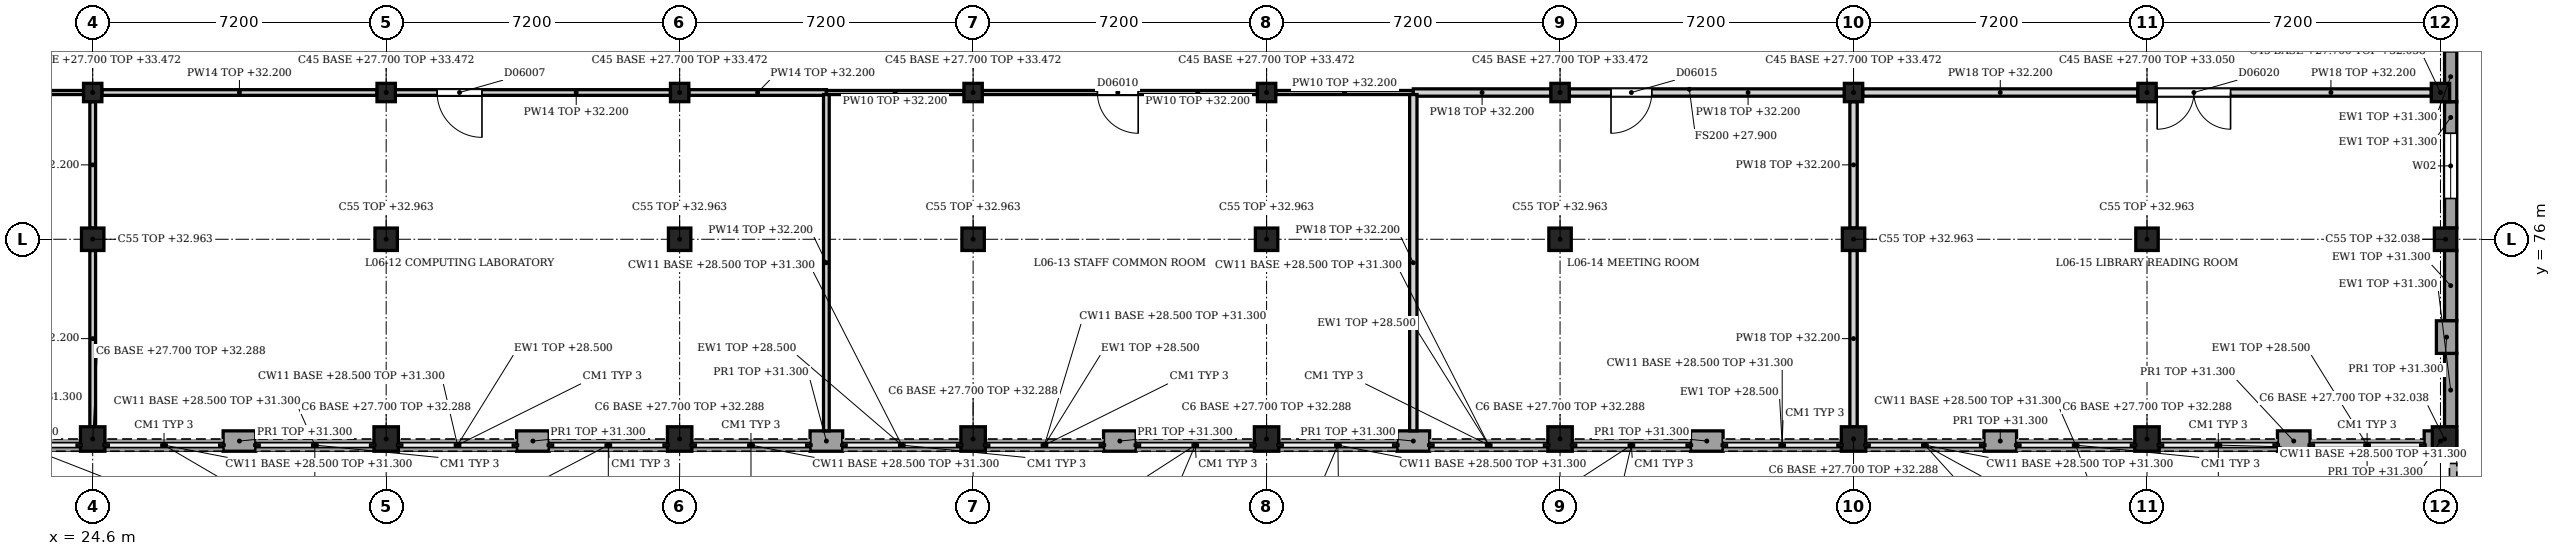
"""IFC4 building model, lengths in metres.
Left out: names, types, materials, properties, quantities, classifications, styles, units other than length and angle.
Written with IfcOpenShell. Run it as: python <this file> out.ifc"""

import sys

from ifc_helpers import new_model, si_unit, direction, frame, frame_2d, origin, origin_2d, place, context, subcontext, project, spatial, rectangle, extrude, element, fill, save


model = new_model("IFC4")
c1 = context("Model", 3, precision=1e-05, world=origin(), true_north=direction((0.0, 1.0)))
c2 = subcontext(c1, "Body", "Model", "MODEL_VIEW")
j1 = project(units=[si_unit("LENGTHUNIT", "METRE"), si_unit("PLANEANGLEUNIT", "RADIAN")], contexts=[c1])
p1 = place(None, origin())
s1 = spatial("IfcSite", under=j1, at=p1, CompositionType="ELEMENT")
p2 = place(p1, origin())
s2 = spatial("IfcBuilding", under=s1, at=p2, CompositionType="ELEMENT")
p3 = place(p2, frame((0.0, 0.0, 27.9)))
s3 = spatial("IfcBuildingStorey", under=s2, at=p3, CompositionType="ELEMENT", Elevation=27.9)
for number, where, z_axis, x_axis in (
    (1, (24.6, 76.0, 0.0), (0.0, 0.0, 1.0), (1.0, 0.0, 0.0)),
    (2, (31.8, 76.0, 0.0), (0.0, 0.0, 1.0), (1.0, 0.0, 0.0)),
    (3, (39.0, 76.0, 0.0), (0.0, 0.0, 1.0), (1.0, 0.0, 0.0)),
    (4, (46.2, 76.0, 0.0), (0.0, 0.0, 1.0), (1.0, 0.0, 0.0)),
    (5, (53.4, 76.0, 0.0), (0.0, 0.0, 1.0), (1.0, 0.0, 0.0)),
    (6, (60.6, 76.0, 0.0), (0.0, 0.0, 1.0), (1.0, 0.0, 0.0)),
    (7, (67.8, 76.0, 0.0), (0.0, 0.0, 1.0), (1.0, 0.0, 0.0)),
    (8, (75.0, 76.0, 0.0), (0.0, 0.0, 1.0), (1.0, 0.0, 0.0)),
):
    element("IfcColumn", number, at=place(p3, frame(where, z_axis=z_axis, x_axis=x_axis)), inside=s3, PredefinedType="COLUMN", context=c2, shape_type="SweptSolid", body=[
        extrude(rectangle(XDim=0.55, YDim=0.55, at=origin_2d()), origin(), (0.0, 0.0, 1.0), 5.063),
    ])
p4 = place(p3, frame((82.325, 76.0, 0.0), z_axis=(0.0, 0.0, 1.0), x_axis=(1.0, 0.0, 0.0)))
e9 = element("IfcColumn", 9, at=p4, inside=s3, PredefinedType="COLUMN", context=c2, shape_type="SweptSolid", body=[
    extrude(rectangle(XDim=0.55, YDim=0.55, at=origin_2d()), origin(), (0.0, 0.0, 1.0), 4.138),
])
for number, where, z_axis, x_axis in (
    (10, (24.6, 71.1, -0.2), (0.0, 0.0, 1.0), (1.0, 0.0, 0.0)),
    (11, (31.8, 71.1, -0.2), (0.0, 0.0, 1.0), (1.0, 0.0, 0.0)),
    (12, (39.0, 71.1, -0.2), (0.0, 0.0, 1.0), (1.0, 0.0, 0.0)),
    (13, (46.2, 71.1, -0.2), (0.0, 0.0, 1.0), (1.0, 0.0, 0.0)),
    (14, (53.4, 71.1, -0.2), (0.0, 0.0, 1.0), (1.0, 0.0, 0.0)),
    (15, (60.6, 71.1, -0.2), (0.0, 0.0, 1.0), (1.0, 0.0, 0.0)),
    (16, (67.8, 71.1, -0.2), (0.0, 0.0, 1.0), (1.0, 0.0, 0.0)),
    (17, (75.0, 71.1, -0.2), (0.0, 0.0, 1.0), (1.0, 0.0, 0.0)),
):
    element("IfcColumn", number, at=place(p3, frame(where, z_axis=z_axis, x_axis=x_axis)), inside=s3, PredefinedType="COLUMN", context=c2, shape_type="SweptSolid", body=[
        extrude(rectangle(XDim=0.6, YDim=0.6, at=origin_2d()), origin(), (0.0, 0.0, 1.0), 4.588),
    ])
p5 = place(p3, frame((82.3, 71.1, -0.2), z_axis=(0.0, 0.0, 1.0), x_axis=(1.0, 0.0, 0.0)))
e18 = element("IfcColumn", 18, at=p5, inside=s3, PredefinedType="COLUMN", context=c2, shape_type="SweptSolid", body=[
    extrude(rectangle(XDim=0.6, YDim=0.6, at=origin_2d()), origin(), (0.0, 0.0, 1.0), 4.338),
])
for number, where, z_axis, x_axis in (
    (19, (24.6, 79.6, -0.2), (0.0, 0.0, 1.0), (1.0, 0.0, 0.0)),
    (20, (31.8, 79.6, -0.2), (0.0, 0.0, 1.0), (1.0, 0.0, 0.0)),
    (21, (39.0, 79.6, -0.2), (0.0, 0.0, 1.0), (1.0, 0.0, 0.0)),
    (22, (46.2, 79.6, -0.2), (0.0, 0.0, 1.0), (1.0, 0.0, 0.0)),
    (23, (53.4, 79.6, -0.2), (0.0, 0.0, 1.0), (1.0, 0.0, 0.0)),
    (24, (60.6, 79.6, -0.2), (0.0, 0.0, 1.0), (1.0, 0.0, 0.0)),
    (25, (67.8, 79.6, -0.2), (0.0, 0.0, 1.0), (1.0, 0.0, 0.0)),
):
    element("IfcColumn", number, at=place(p3, frame(where, z_axis=z_axis, x_axis=x_axis)), inside=s3, PredefinedType="COLUMN", context=c2, shape_type="SweptSolid", body=[
        extrude(rectangle(XDim=0.45, YDim=0.45, at=origin_2d()), origin(), (0.0, 0.0, 1.0), 5.772),
    ])
p6 = place(p3, frame((75.0, 79.6, -0.2), z_axis=(0.0, 0.0, 1.0), x_axis=(1.0, 0.0, 0.0)))
e26 = element("IfcColumn", 26, at=p6, inside=s3, PredefinedType="COLUMN", context=c2, shape_type="SweptSolid", body=[
    extrude(rectangle(XDim=0.45, YDim=0.45, at=origin_2d()), origin(), (0.0, 0.0, 1.0), 5.35),
])
p7 = place(p3, frame((82.2, 79.6, -0.2), z_axis=(0.0, 0.0, 1.0), x_axis=(1.0, 0.0, 0.0)))
e27 = element("IfcColumn", 27, at=p7, inside=s3, PredefinedType="COLUMN", context=c2, shape_type="SweptSolid", body=[
    extrude(rectangle(XDim=0.45, YDim=0.45, at=origin_2d()), origin(), (0.0, 0.0, 1.0), 4.338),
])
for number, where, z_axis, x_axis in (
    (28, (82.6, 71.05, 0.0), (0.0, 0.0, 1.0), (-1.0, 0.0, 0.0)),
    (29, (79.0, 71.05, 0.0), (0.0, 0.0, 1.0), (-1.0, 0.0, 0.0)),
    (30, (71.8, 71.05, 0.0), (0.0, 0.0, 1.0), (-1.0, 0.0, 0.0)),
    (31, (64.6, 71.05, 0.0), (0.0, 0.0, 1.0), (-1.0, 0.0, 0.0)),
):
    element("IfcWall", number, at=place(p3, frame(where, z_axis=z_axis, x_axis=x_axis)), inside=s3, PredefinedType="SOLIDWALL", context=c2, shape_type="SweptSolid", body=[
        extrude(rectangle(XDim=0.8, YDim=0.5, at=frame_2d((0.4, 0.0))), origin(), (0.0, 0.0, 1.0), 3.4),
    ])
p8 = place(p3, frame((57.4, 71.05, 0.0), z_axis=(0.0, 0.0, 1.0), x_axis=(-1.0, 0.0, 0.0)))
e32 = element("IfcWall", 32, at=p8, inside=s3, PredefinedType="SOLIDWALL", context=c2, shape_type="SweptSolid", body=[
    extrude(rectangle(XDim=0.8, YDim=0.5, at=frame_2d((0.4, 0.0))), origin(), (0.0, 0.0, 1.0), 3.4),
])
for number, where, z_axis, x_axis in (
    (33, (50.2, 71.05, 0.0), (0.0, 0.0, 1.0), (-1.0, 0.0, 0.0)),
    (34, (43.0, 71.05, 0.0), (0.0, 0.0, 1.0), (-1.0, 0.0, 0.0)),
    (35, (35.8, 71.05, 0.0), (0.0, 0.0, 1.0), (-1.0, 0.0, 0.0)),
    (36, (28.6, 71.05, 0.0), (0.0, 0.0, 1.0), (-1.0, 0.0, 0.0)),
):
    element("IfcWall", number, at=place(p3, frame(where, z_axis=z_axis, x_axis=x_axis)), inside=s3, PredefinedType="SOLIDWALL", context=c2, shape_type="SweptSolid", body=[
        extrude(rectangle(XDim=0.8, YDim=0.5, at=frame_2d((0.4, 0.0))), origin(), (0.0, 0.0, 1.0), 3.4),
    ])
p9 = place(p3, frame((81.8, 70.95, 0.0), z_axis=(0.0, 0.0, 1.0), x_axis=(-1.0, 0.0, 0.0)))
e37 = element("IfcWall", 37, at=p9, inside=s3, PredefinedType="SOLIDWALL", context=c2, shape_type="SweptSolid", body=[
    extrude(rectangle(XDim=2.8, YDim=0.3, at=frame_2d((1.4, 0.0))), origin(), (0.0, 0.0, 1.0), 0.6),
])
for number, where, z_axis, x_axis in (
    (38, (78.2, 70.95, 0.0), (0.0, 0.0, 1.0), (-1.0, 0.0, 0.0)),
    (39, (74.7, 70.95, 0.0), (0.0, 0.0, 1.0), (-1.0, 0.0, 0.0)),
    (40, (71.0, 70.95, 0.0), (0.0, 0.0, 1.0), (-1.0, 0.0, 0.0)),
    (41, (67.5, 70.95, 0.0), (0.0, 0.0, 1.0), (-1.0, 0.0, 0.0)),
):
    element("IfcWall", number, at=place(p3, frame(where, z_axis=z_axis, x_axis=x_axis)), inside=s3, PredefinedType="SOLIDWALL", context=c2, shape_type="SweptSolid", body=[
        extrude(rectangle(XDim=2.9, YDim=0.3, at=frame_2d((1.45, 0.0))), origin(), (0.0, 0.0, 1.0), 0.6),
    ])
for number, where, z_axis, x_axis in (
    (42, (63.8, 70.95, 0.0), (0.0, 0.0, 1.0), (-1.0, 0.0, 0.0)),
    (43, (60.3, 70.95, 0.0), (0.0, 0.0, 1.0), (-1.0, 0.0, 0.0)),
    (44, (56.6, 70.95, 0.0), (0.0, 0.0, 1.0), (-1.0, 0.0, 0.0)),
    (45, (53.1, 70.95, 0.0), (0.0, 0.0, 1.0), (-1.0, 0.0, 0.0)),
):
    element("IfcWall", number, at=place(p3, frame(where, z_axis=z_axis, x_axis=x_axis)), inside=s3, PredefinedType="SOLIDWALL", context=c2, shape_type="SweptSolid", body=[
        extrude(rectangle(XDim=2.9, YDim=0.3, at=frame_2d((1.45, 0.0))), origin(), (0.0, 0.0, 1.0), 0.6),
    ])
for number, where, z_axis, x_axis in (
    (46, (49.4, 70.95, 0.0), (0.0, 0.0, 1.0), (-1.0, 0.0, 0.0)),
    (47, (45.9, 70.95, 0.0), (0.0, 0.0, 1.0), (-1.0, 0.0, 0.0)),
    (48, (42.2, 70.95, 0.0), (0.0, 0.0, 1.0), (-1.0, 0.0, 0.0)),
    (49, (38.7, 70.95, 0.0), (0.0, 0.0, 1.0), (-1.0, 0.0, 0.0)),
    (50, (35.0, 70.95, 0.0), (0.0, 0.0, 1.0), (-1.0, 0.0, 0.0)),
    (51, (31.5, 70.95, 0.0), (0.0, 0.0, 1.0), (-1.0, 0.0, 0.0)),
):
    element("IfcWall", number, at=place(p3, frame(where, z_axis=z_axis, x_axis=x_axis)), inside=s3, PredefinedType="SOLIDWALL", context=c2, shape_type="SweptSolid", body=[
        extrude(rectangle(XDim=2.9, YDim=0.3, at=frame_2d((1.45, 0.0))), origin(), (0.0, 0.0, 1.0), 0.6),
    ])
for number, where, z_axis, x_axis in (
    (52, (27.8, 70.95, 0.0), (0.0, 0.0, 1.0), (-1.0, 0.0, 0.0)),
    (53, (24.3, 70.95, 0.0), (0.0, 0.0, 1.0), (-1.0, 0.0, 0.0)),
):
    element("IfcWall", number, at=place(p3, frame(where, z_axis=z_axis, x_axis=x_axis)), inside=s3, PredefinedType="SOLIDWALL", context=c2, shape_type="SweptSolid", body=[
        extrude(rectangle(XDim=2.9, YDim=0.3, at=frame_2d((1.45, 0.0))), origin(), (0.0, 0.0, 1.0), 0.6),
    ])
p10 = place(p3, frame((82.35, 74.0, 0.0), z_axis=(0.0, 0.0, 1.0), x_axis=(0.0, -1.0, 0.0)))
e54 = element("IfcWall", 54, at=p10, inside=s3, PredefinedType="SOLIDWALL", context=c2, shape_type="SweptSolid", body=[
    extrude(rectangle(XDim=0.8, YDim=0.5, at=frame_2d((0.4, 0.0))), origin(), (0.0, 0.0, 1.0), 3.4),
])
p11 = place(p3, frame((82.45, 82.925, 0.0), z_axis=(0.0, 0.0, 1.0), x_axis=(0.0, -1.0, 0.0)))
e55 = element("IfcWall", 55, at=p11, inside=s3, PredefinedType="SOLIDWALL", context=c2, shape_type="SweptSolid", body=[
    extrude(rectangle(XDim=3.55, YDim=0.3, at=frame_2d((1.775, 0.0))), origin(), (0.0, 0.0, 1.0), 3.4),
])
p12 = place(p11, frame((0.725, 0.0, 0.9)))
e56 = element("IfcOpeningElement", 56, at=p12, cuts=e55, PredefinedType="OPENING", context=c2, shape_type="SweptSolid", body=[
    extrude(rectangle(XDim=1.6, YDim=1.8, at=frame_2d((0.8, 0.9))), frame((0.0, 0.16, 0.0), z_axis=(0.0, -1.0, 0.0), x_axis=(1.0, 0.0, 0.0)), (0.0, 0.0, 1.0), 0.32),
])
p13 = place(p3, frame((82.45, 79.375, 0.0), z_axis=(0.0, 0.0, 1.0), x_axis=(0.0, -1.0, 0.0)))
e57 = element("IfcWall", 57, at=p13, inside=s3, PredefinedType="SOLIDWALL", context=c2, shape_type="SweptSolid", body=[
    extrude(rectangle(XDim=3.1, YDim=0.3, at=frame_2d((1.55, 0.0))), origin(), (0.0, 0.0, 1.0), 3.4),
])
p14 = place(p13, frame((0.775, 0.0, 0.9)))
e58 = element("IfcOpeningElement", 58, at=p14, cuts=e57, PredefinedType="OPENING", context=c2, shape_type="SweptSolid", body=[
    extrude(rectangle(XDim=1.6, YDim=1.8, at=frame_2d((0.8, 0.9))), frame((0.0, 0.16, 0.0), z_axis=(0.0, -1.0, 0.0), x_axis=(1.0, 0.0, 0.0)), (0.0, 0.0, 1.0), 0.32),
])
p15 = place(p3, frame((82.45, 75.725, 0.0), z_axis=(0.0, 0.0, 1.0), x_axis=(0.0, -1.0, 0.0)))
e59 = element("IfcWall", 59, at=p15, inside=s3, PredefinedType="SOLIDWALL", context=c2, shape_type="SweptSolid", body=[
    extrude(rectangle(XDim=1.725, YDim=0.3, at=frame_2d((0.863, 0.0))), origin(), (0.0, 0.0, 1.0), 3.4),
])
p16 = place(p3, frame((82.45, 73.2, 0.0), z_axis=(0.0, 0.0, 1.0), x_axis=(0.0, -1.0, 0.0)))
e60 = element("IfcWall", 60, at=p16, inside=s3, PredefinedType="SOLIDWALL", context=c2, shape_type="SweptSolid", body=[
    extrude(rectangle(XDim=1.8, YDim=0.3, at=frame_2d((0.9, 0.0))), origin(), (0.0, 0.0, 1.0), 3.4),
])
p17 = place(p3, frame((82.51, 68.7, 0.0), z_axis=(0.0, 0.0, 1.0), x_axis=(0.0, 1.0, 0.0)))
e61 = element("IfcWall", 61, at=p17, inside=s3, PredefinedType="PARAPET", context=c2, shape_type="SweptSolid", body=[
    extrude(rectangle(XDim=1.8, YDim=0.18, at=frame_2d((0.9, 0.0))), origin(), (0.0, 0.0, 1.0), 1.1),
])
p18 = place(p3, frame((17.625, 79.6, 0.0), z_axis=(0.0, 0.0, 1.0), x_axis=(1.0, 0.0, 0.0)))
e62 = element("IfcWall", 62, at=p18, inside=s3, PredefinedType="PARTITIONING", context=c2, shape_type="SweptSolid", body=[
    extrude(rectangle(XDim=6.75, YDim=0.1, at=frame_2d((3.375, 0.0))), origin(), (0.0, 0.0, 1.0), 4.3),
])
p19 = place(p3, frame((24.825, 79.6, 0.0), z_axis=(0.0, 0.0, 1.0), x_axis=(1.0, 0.0, 0.0)))
e63 = element("IfcWall", 63, at=p19, inside=s3, PredefinedType="PARTITIONING", context=c2, shape_type="SweptSolid", body=[
    extrude(rectangle(XDim=6.75, YDim=0.14, at=frame_2d((3.375, 0.0))), origin(), (0.0, 0.0, 1.0), 4.3),
])
p20 = place(p3, frame((38.775, 79.6, 0.0), z_axis=(0.0, 0.0, 1.0), x_axis=(-1.0, 0.0, 0.0)))
e64 = element("IfcWall", 64, at=p20, inside=s3, PredefinedType="PARTITIONING", context=c2, shape_type="SweptSolid", body=[
    extrude(rectangle(XDim=6.75, YDim=0.14, at=frame_2d((3.375, 0.0))), origin(), (0.0, 0.0, 1.0), 4.3),
])
p21 = place(p20, frame((4.625, 0.0, 0.0)))
e65 = element("IfcOpeningElement", 65, at=p21, cuts=e64, PredefinedType="OPENING", context=c2, shape_type="SweptSolid", body=[
    extrude(rectangle(XDim=1.1, YDim=2.2, at=frame_2d((0.55, 1.1))), frame((0.0, 0.08, 0.0), z_axis=(0.0, -1.0, 0.0), x_axis=(1.0, 0.0, 0.0)), (0.0, 0.0, 1.0), 0.16),
])
p22 = place(p3, frame((39.225, 79.6, 0.0), z_axis=(0.0, 0.0, 1.0), x_axis=(1.0, 0.0, 0.0)))
e66 = element("IfcWall", 66, at=p22, inside=s3, PredefinedType="PARTITIONING", context=c2, shape_type="SweptSolid", body=[
    extrude(rectangle(XDim=3.375, YDim=0.14, at=frame_2d((1.688, 0.0))), origin(), (0.0, 0.0, 1.0), 4.3),
])
p23 = place(p3, frame((42.6, 79.6, 0.0), z_axis=(0.0, 0.0, 1.0), x_axis=(1.0, 0.0, 0.0)))
e67 = element("IfcWall", 67, at=p23, inside=s3, PredefinedType="PARTITIONING", context=c2, shape_type="SweptSolid", body=[
    extrude(rectangle(XDim=3.375, YDim=0.1, at=frame_2d((1.688, 0.0))), origin(), (0.0, 0.0, 1.0), 4.3),
])
p24 = place(p3, frame((53.175, 79.6, 0.0), z_axis=(0.0, 0.0, 1.0), x_axis=(-1.0, 0.0, 0.0)))
e68 = element("IfcWall", 68, at=p24, inside=s3, PredefinedType="PARTITIONING", context=c2, shape_type="SweptSolid", body=[
    extrude(rectangle(XDim=6.75, YDim=0.1, at=frame_2d((3.375, 0.0))), origin(), (0.0, 0.0, 1.0), 4.3),
])
p25 = place(p24, frame((2.925, 0.0, 0.0)))
e69 = element("IfcOpeningElement", 69, at=p25, cuts=e68, PredefinedType="OPENING", context=c2, shape_type="SweptSolid", body=[
    extrude(rectangle(XDim=1.0, YDim=2.1, at=frame_2d((0.5, 1.05))), frame((0.0, 0.06, 0.0), z_axis=(0.0, -1.0, 0.0), x_axis=(1.0, 0.0, 0.0)), (0.0, 0.0, 1.0), 0.12),
])
p26 = place(p3, frame((53.625, 79.6, 0.0), z_axis=(0.0, 0.0, 1.0), x_axis=(1.0, 0.0, 0.0)))
e70 = element("IfcWall", 70, at=p26, inside=s3, PredefinedType="PARTITIONING", context=c2, shape_type="SweptSolid", body=[
    extrude(rectangle(XDim=3.375, YDim=0.1, at=frame_2d((1.688, 0.0))), origin(), (0.0, 0.0, 1.0), 4.3),
])
p27 = place(p3, frame((57.0, 79.6, 0.0), z_axis=(0.0, 0.0, 1.0), x_axis=(1.0, 0.0, 0.0)))
e71 = element("IfcWall", 71, at=p27, inside=s3, PredefinedType="PARTITIONING", context=c2, shape_type="SweptSolid", body=[
    extrude(rectangle(XDim=3.375, YDim=0.18, at=frame_2d((1.688, 0.0))), origin(), (0.0, 0.0, 1.0), 4.3),
])
p28 = place(p3, frame((67.575, 79.6, 0.0), z_axis=(0.0, 0.0, 1.0), x_axis=(-1.0, 0.0, 0.0)))
e72 = element("IfcWall", 72, at=p28, inside=s3, PredefinedType="PARTITIONING", context=c2, shape_type="SweptSolid", body=[
    extrude(rectangle(XDim=6.75, YDim=0.18, at=frame_2d((3.375, 0.0))), origin(), (0.0, 0.0, 1.0), 4.3),
])
p29 = place(p28, frame((4.725, 0.0, 0.0)))
e73 = element("IfcOpeningElement", 73, at=p29, cuts=e72, PredefinedType="OPENING", context=c2, shape_type="SweptSolid", body=[
    extrude(rectangle(XDim=1.0, YDim=2.1, at=frame_2d((0.5, 1.05))), frame((0.0, 0.1, 0.0), z_axis=(0.0, -1.0, 0.0), x_axis=(1.0, 0.0, 0.0)), (0.0, 0.0, 1.0), 0.2),
])
p30 = place(p3, frame((68.025, 79.6, 0.0), z_axis=(0.0, 0.0, 1.0), x_axis=(1.0, 0.0, 0.0)))
e74 = element("IfcWall", 74, at=p30, inside=s3, PredefinedType="PARTITIONING", context=c2, shape_type="SweptSolid", body=[
    extrude(rectangle(XDim=6.75, YDim=0.18, at=frame_2d((3.375, 0.0))), origin(), (0.0, 0.0, 1.0), 4.3),
])
p31 = place(p3, frame((75.225, 79.6, 0.0), z_axis=(0.0, 0.0, 1.0), x_axis=(1.0, 0.0, 0.0)))
e75 = element("IfcWall", 75, at=p31, inside=s3, PredefinedType="PARTITIONING", context=c2, shape_type="SweptSolid", body=[
    extrude(rectangle(XDim=6.75, YDim=0.18, at=frame_2d((3.375, 0.0))), origin(), (0.0, 0.0, 1.0), 4.3),
])
p32 = place(p31, frame((0.025, 0.0, 0.0)))
e76 = element("IfcOpeningElement", 76, at=p32, cuts=e75, PredefinedType="OPENING", context=c2, shape_type="SweptSolid", body=[
    extrude(rectangle(XDim=1.8, YDim=2.1, at=frame_2d((0.9, 1.05))), frame((0.0, 0.1, 0.0), z_axis=(0.0, -1.0, 0.0), x_axis=(1.0, 0.0, 0.0)), (0.0, 0.0, 1.0), 0.2),
])
p33 = place(p3, frame((24.6, 71.4, 0.0), z_axis=(0.0, 0.0, 1.0), x_axis=(0.0, 1.0, 0.0)))
e77 = element("IfcWall", 77, at=p33, inside=s3, PredefinedType="PARTITIONING", context=c2, shape_type="SweptSolid", body=[
    extrude(rectangle(XDim=4.325, YDim=0.14, at=frame_2d((2.163, 0.0))), origin(), (0.0, 0.0, 1.0), 4.3),
])
p34 = place(p3, frame((24.6, 76.275, 0.0), z_axis=(0.0, 0.0, 1.0), x_axis=(0.0, 1.0, 0.0)))
e78 = element("IfcWall", 78, at=p34, inside=s3, PredefinedType="PARTITIONING", context=c2, shape_type="SweptSolid", body=[
    extrude(rectangle(XDim=3.1, YDim=0.14, at=frame_2d((1.55, 0.0))), origin(), (0.0, 0.0, 1.0), 4.3),
])
p35 = place(p3, frame((42.6, 71.3, 0.0), z_axis=(0.0, 0.0, 1.0), x_axis=(0.0, 1.0, 0.0)))
e79 = element("IfcWall", 79, at=p35, inside=s3, PredefinedType="PARTITIONING", context=c2, shape_type="SweptSolid", body=[
    extrude(rectangle(XDim=8.25, YDim=0.14, at=frame_2d((4.125, 0.0))), origin(), (0.0, 0.0, 1.0), 4.3),
])
p36 = place(p3, frame((57.0, 71.3, 0.0), z_axis=(0.0, 0.0, 1.0), x_axis=(0.0, 1.0, 0.0)))
e80 = element("IfcWall", 80, at=p36, inside=s3, PredefinedType="PARTITIONING", context=c2, shape_type="SweptSolid", body=[
    extrude(rectangle(XDim=8.25, YDim=0.18, at=frame_2d((4.125, 0.0))), origin(), (0.0, 0.0, 1.0), 4.3),
])
p37 = place(p3, frame((67.8, 71.4, 0.0), z_axis=(0.0, 0.0, 1.0), x_axis=(0.0, 1.0, 0.0)))
e81 = element("IfcWall", 81, at=p37, inside=s3, PredefinedType="PARTITIONING", context=c2, shape_type="SweptSolid", body=[
    extrude(rectangle(XDim=4.325, YDim=0.18, at=frame_2d((2.163, 0.0))), origin(), (0.0, 0.0, 1.0), 4.3),
])
p38 = place(p3, frame((67.8, 76.275, 0.0), z_axis=(0.0, 0.0, 1.0), x_axis=(0.0, 1.0, 0.0)))
e82 = element("IfcWall", 82, at=p38, inside=s3, PredefinedType="PARTITIONING", context=c2, shape_type="SweptSolid", body=[
    extrude(rectangle(XDim=3.1, YDim=0.18, at=frame_2d((1.55, 0.0))), origin(), (0.0, 0.0, 1.0), 4.3),
])
p39 = place(p12, origin())
e83 = element("IfcWindow", 83, at=p39, inside=s3, PartitioningType="SINGLE_PANEL", PredefinedType="WINDOW", context=c2, shape_type="SweptSolid", body=[
    extrude(rectangle(XDim=1.6, YDim=1.8, at=frame_2d((0.8, 0.9))), frame((0.0, 0.03, 0.0), z_axis=(0.0, -1.0, 0.0), x_axis=(1.0, 0.0, 0.0)), (0.0, 0.0, 1.0), 0.06),
])
fill(e56, e83)
p40 = place(p14, origin())
e84 = element("IfcWindow", 84, at=p40, inside=s3, PartitioningType="SINGLE_PANEL", PredefinedType="WINDOW", context=c2, shape_type="SweptSolid", body=[
    extrude(rectangle(XDim=1.6, YDim=1.8, at=frame_2d((0.8, 0.9))), frame((0.0, 0.03, 0.0), z_axis=(0.0, -1.0, 0.0), x_axis=(1.0, 0.0, 0.0)), (0.0, 0.0, 1.0), 0.06),
])
fill(e58, e84)
p41 = place(p21, origin())
e85 = element("IfcDoor", 85, at=p41, inside=s3, OperationType="SINGLE_SWING_RIGHT", PredefinedType="DOOR", context=c2, shape_type="SweptSolid", body=[
    extrude(rectangle(XDim=1.1, YDim=2.2, at=frame_2d((0.55, 1.1))), frame((0.0, 0.025, 0.0), z_axis=(0.0, -1.0, 0.0), x_axis=(1.0, 0.0, 0.0)), (0.0, 0.0, 1.0), 0.05),
])
fill(e65, e85)
p42 = place(p25, origin())
e86 = element("IfcDoor", 86, at=p42, inside=s3, OperationType="SINGLE_SWING_RIGHT", PredefinedType="DOOR", context=c2, shape_type="SweptSolid", body=[
    extrude(rectangle(XDim=1.0, YDim=2.1, at=frame_2d((0.5, 1.05))), frame((0.0, 0.025, 0.0), z_axis=(0.0, -1.0, 0.0), x_axis=(1.0, 0.0, 0.0)), (0.0, 0.0, 1.0), 0.05),
])
fill(e69, e86)
p43 = place(p29, origin())
e87 = element("IfcDoor", 87, at=p43, inside=s3, OperationType="SINGLE_SWING_RIGHT", PredefinedType="DOOR", context=c2, shape_type="SweptSolid", body=[
    extrude(rectangle(XDim=1.0, YDim=2.1, at=frame_2d((0.5, 1.05))), frame((0.0, 0.025, 0.0), z_axis=(0.0, -1.0, 0.0), x_axis=(1.0, 0.0, 0.0)), (0.0, 0.0, 1.0), 0.05),
])
fill(e73, e87)
p44 = place(p32, origin())
e88 = element("IfcDoor", 88, at=p44, inside=s3, OperationType="SINGLE_SWING_LEFT", PredefinedType="DOOR", context=c2, shape_type="SweptSolid", body=[
    extrude(rectangle(XDim=1.8, YDim=2.1, at=frame_2d((0.9, 1.05))), frame((0.0, 0.025, 0.0), z_axis=(0.0, -1.0, 0.0), x_axis=(1.0, 0.0, 0.0)), (0.0, 0.0, 1.0), 0.05),
])
fill(e76, e88)
save(model, sys.argv[1])
